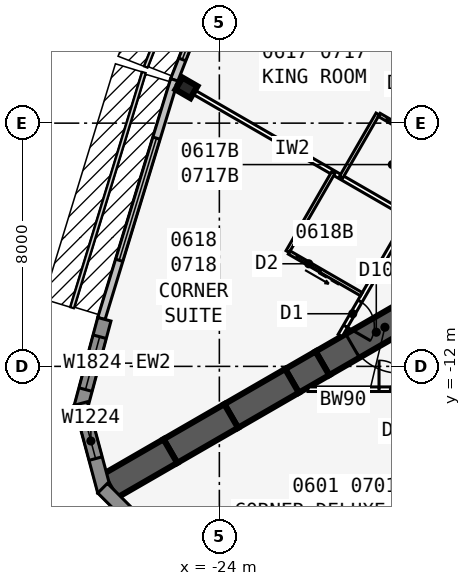
"""IFC4 building model, lengths in metres.
Left out: names, types, materials, properties, quantities, classifications, styles, units other than length and angle.
Written with IfcOpenShell. Run it as: python <this file> out.ifc"""

import sys

from ifc_helpers import new_model, si_unit, direction, frame, frame_2d, origin, origin_2d, place, context, subcontext, project, spatial, polyline, rectangle, i_section, outline, extrude, element, fill, save


model = new_model("IFC4")
c1 = context("Model", 3, precision=1e-05, world=origin(), true_north=direction((0.0, 1.0)))
c2 = subcontext(c1, "Body", "Model", "MODEL_VIEW")
j1 = project(units=[si_unit("LENGTHUNIT", "METRE"), si_unit("PLANEANGLEUNIT", "RADIAN")], contexts=[c1])
p1 = place(None, origin())
s1 = spatial("IfcSite", under=j1, at=p1, CompositionType="ELEMENT")
p2 = place(p1, origin())
s2 = spatial("IfcBuilding", under=s1, at=p2, CompositionType="ELEMENT")
p3 = place(p2, frame((0.0, 0.0, 31.9)))
s3 = spatial("IfcBuildingStorey", under=s2, at=p3, CompositionType="ELEMENT", Elevation=31.9)
p4 = place(p3, frame((-16.5, -9.526, 0.0), z_axis=(0.0, 0.0, 1.0), x_axis=(-0.866031398331, -0.499989616998, 0.0)))
e1 = element("IfcWall", 1, at=p4, inside=s3, PredefinedType="SHEAR", context=c2, shape_type="SweptSolid", body=[
    extrude(rectangle(XDim=4.746, YDim=0.9, at=frame_2d((2.373, 0.0))), origin(), (0.0, 0.0, 1.0), 3.4),
])
p5 = place(p4, frame((1.8, 0.0, 0.0)))
e2 = element("IfcOpeningElement", 2, at=p5, cuts=e1, PredefinedType="OPENING", context=c2, shape_type="SweptSolid", body=[
    extrude(rectangle(XDim=1.8, YDim=2.13, at=frame_2d((0.9, 1.065))), frame((0.0, 0.46, 0.0), z_axis=(0.0, -1.0, 0.0), x_axis=(1.0, 0.0, 0.0)), (0.0, 0.0, 1.0), 0.92),
])
p6 = place(p3, frame((-20.61, -11.899, 0.0), z_axis=(0.0, 0.0, 1.0), x_axis=(-0.866009537788, -0.500027479704, 0.0)))
e3 = element("IfcWall", 3, at=p6, inside=s3, PredefinedType="SHEAR", context=c2, shape_type="SweptSolid", body=[
    extrude(rectangle(XDim=1.155, YDim=0.9, at=frame_2d((0.577, 0.0))), origin(), (0.0, 0.0, 1.0), 3.4),
])
for number, where, z_axis, x_axis in (
    (4, (-21.61, -12.477, 0.0), (0.0, 0.0, 1.0), (-0.866, -0.5, 0.0)),
    (5, (-23.61, -13.631, 0.0), (0.0, 0.0, 1.0), (-0.866, -0.5, 0.0)),
    (6, (-25.61, -14.786, 0.0), (0.0, 0.0, 1.0), (-0.866, -0.5, 0.0)),
):
    element("IfcWall", number, at=place(p3, frame(where, z_axis=z_axis, x_axis=x_axis)), inside=s3, PredefinedType="SHEAR", context=c2, shape_type="SweptSolid", body=[
        extrude(rectangle(XDim=2.309, YDim=0.9, at=frame_2d((1.155, 0.0))), origin(), (0.0, 0.0, 1.0), 3.4),
    ])
p7 = place(p3, frame((-25.083, -2.839, 0.0), z_axis=(0.0, 0.0, 1.0), x_axis=(-0.5, -0.866025403784, 0.0)))
e7 = element("IfcColumn", 7, at=p7, inside=s3, PredefinedType="COLUMN", context=c2, shape_type="SweptSolid", body=[
    extrude(i_section(OverallWidth=0.455, OverallDepth=0.569, WebThickness=0.078, FlangeThickness=0.125, at=origin_2d()), origin(), (0.0, 0.0, 1.0), 3.4),
])
p8 = place(p3, frame((-23.645, 2.126, 0.0), z_axis=(0.0, 0.0, 1.0), x_axis=(-0.364013463868, -0.931393685894, 0.0)))
e8 = element("IfcWall", 8, at=p8, inside=s3, PredefinedType="STANDARD", context=c2, shape_type="SweptSolid", body=[
    extrude(rectangle(XDim=5.058, YDim=0.25, at=frame_2d((2.529, 0.0))), origin(), (0.0, 0.0, 1.0), 3.235),
])
p9 = place(p8, frame((0.729, 0.0, 0.45)))
e9 = element("IfcOpeningElement", 9, at=p9, cuts=e8, PredefinedType="OPENING", context=c2, shape_type="SweptSolid", body=[
    extrude(rectangle(XDim=3.6, YDim=2.4, at=frame_2d((1.8, 1.2))), frame((0.0, 0.135, 0.0), z_axis=(0.0, -1.0, 0.0), x_axis=(1.0, 0.0, 0.0)), (0.0, 0.0, 1.0), 0.27),
])
p10 = place(p3, frame((-25.483, -2.575, 0.0), z_axis=(0.0, 0.0, 1.0), x_axis=(-0.2919790669, -0.956424709265, 0.0)))
e10 = element("IfcWall", 10, at=p10, inside=s3, PredefinedType="STANDARD", context=c2, shape_type="SweptSolid", body=[
    extrude(rectangle(XDim=8.211, YDim=0.25, at=frame_2d((4.105, 0.0))), origin(), (0.0, 0.0, 1.0), 3.235),
])
p11 = place(p10, frame((2.006, 0.0, 0.45)))
e11 = element("IfcOpeningElement", 11, at=p11, cuts=e10, PredefinedType="OPENING", context=c2, shape_type="SweptSolid", body=[
    extrude(rectangle(XDim=4.2, YDim=2.4, at=frame_2d((2.1, 1.2))), frame((0.0, 0.135, 0.0), z_axis=(0.0, -1.0, 0.0), x_axis=(1.0, 0.0, 0.0)), (0.0, 0.0, 1.0), 0.27),
])
p12 = place(p3, frame((-27.783, -10.45, 0.0), z_axis=(0.0, 0.0, 1.0), x_axis=(-0.258780998834, -0.965936019953, 0.0)))
e12 = element("IfcWall", 12, at=p12, inside=s3, PredefinedType="SOLIDWALL", context=c2, shape_type="SweptSolid", body=[
    extrude(rectangle(XDim=2.989, YDim=0.45, at=frame_2d((1.494, 0.0))), origin(), (0.0, 0.0, 1.0), 3.235),
])
p13 = place(p12, frame((0.594, 0.0, 0.45)))
e13 = element("IfcOpeningElement", 13, at=p13, cuts=e12, PredefinedType="OPENING", context=c2, shape_type="SweptSolid", body=[
    extrude(rectangle(XDim=1.8, YDim=2.4, at=frame_2d((0.9, 1.2))), frame((0.0, 0.235, 0.0), z_axis=(0.0, -1.0, 0.0), x_axis=(1.0, 0.0, 0.0)), (0.0, 0.0, 1.0), 0.47),
])
p14 = place(p3, frame((-28.556, -13.221, 0.0), z_axis=(0.0, 0.0, 1.0), x_axis=(0.258801419081, -0.965930548995, 0.0)))
e14 = element("IfcWall", 14, at=p14, inside=s3, PredefinedType="SOLIDWALL", context=c2, shape_type="SweptSolid", body=[
    extrude(outline(polyline([(2.989, 0.225), (2.929, 0.225), (2.437, 0.093), (2.402, 0.225), (0.0, 0.225), (0.0, -0.225), (2.989, -0.225), (2.989, 0.225)])), origin(), (0.0, 0.0, 1.0), 3.235),
])
p15 = place(p14, frame((0.676, 0.0, 0.45)))
e15 = element("IfcOpeningElement", 15, at=p15, cuts=e14, PredefinedType="OPENING", context=c2, shape_type="SweptSolid", body=[
    extrude(rectangle(XDim=1.2, YDim=2.4, at=frame_2d((0.6, 1.2))), frame((0.0, 0.235, 0.0), z_axis=(0.0, -1.0, 0.0), x_axis=(1.0, 0.0, 0.0)), (0.0, 0.0, 1.0), 0.47),
])
p16 = place(p3, frame((-27.841, -16.007, 0.0), z_axis=(0.0, 0.0, 1.0), x_axis=(0.707025086683, -0.707188466253, 0.0)))
e16 = element("IfcWall", 16, at=p16, inside=s3, PredefinedType="SOLIDWALL", context=c2, shape_type="SweptSolid", body=[
    extrude(outline(polyline([(2.989, 0.225), (0.586, 0.225), (0.551, 0.093), (0.059, 0.225), (0.0, 0.225), (0.0, -0.225), (2.989, -0.225), (2.989, 0.225)])), origin(), (0.0, 0.0, 1.0), 3.235),
])
p17 = place(p16, frame((1.113, 0.0, 0.45)))
e17 = element("IfcOpeningElement", 17, at=p17, cuts=e16, PredefinedType="OPENING", context=c2, shape_type="SweptSolid", body=[
    extrude(rectangle(XDim=1.2, YDim=2.4, at=frame_2d((0.6, 1.2))), frame((0.0, 0.235, 0.0), z_axis=(0.0, -1.0, 0.0), x_axis=(1.0, 0.0, 0.0)), (0.0, 0.0, 1.0), 0.47),
])
p18 = place(p3, frame((-21.086, -12.751, 0.0), z_axis=(0.0, 0.0, 1.0), x_axis=(1.0, 0.0, 0.0)))
e18 = element("IfcWall", 18, at=p18, inside=s3, PredefinedType="PARTITIONING", context=c2, shape_type="SweptSolid", body=[
    extrude(rectangle(XDim=42.172, YDim=0.15, at=frame_2d((21.086, 0.0))), origin(), (0.0, 0.0, 1.0), 3.235),
])
p19 = place(p18, frame((2.338, 0.0, 0.0)))
e19 = element("IfcOpeningElement", 19, at=p19, cuts=e18, PredefinedType="OPENING", context=c2, shape_type="SweptSolid", body=[
    extrude(rectangle(XDim=0.95, YDim=2.13, at=frame_2d((0.475, 1.065))), frame((0.0, 0.085, 0.0), z_axis=(0.0, -1.0, 0.0), x_axis=(1.0, 0.0, 0.0)), (0.0, 0.0, 1.0), 0.17),
])
p20 = place(p18, frame((12.511, 0.0, 0.0)))
e20 = element("IfcOpeningElement", 20, at=p20, cuts=e18, PredefinedType="OPENING", context=c2, shape_type="SweptSolid", body=[
    extrude(rectangle(XDim=0.95, YDim=2.13, at=frame_2d((0.475, 1.065))), frame((0.0, 0.085, 0.0), z_axis=(0.0, -1.0, 0.0), x_axis=(1.0, 0.0, 0.0)), (0.0, 0.0, 1.0), 0.17),
])
p21 = place(p18, frame((18.711, 0.0, 0.0)))
e21 = element("IfcOpeningElement", 21, at=p21, cuts=e18, PredefinedType="OPENING", context=c2, shape_type="SweptSolid", body=[
    extrude(rectangle(XDim=0.95, YDim=2.13, at=frame_2d((0.475, 1.065))), frame((0.0, 0.085, 0.0), z_axis=(0.0, -1.0, 0.0), x_axis=(1.0, 0.0, 0.0)), (0.0, 0.0, 1.0), 0.17),
])
p22 = place(p18, frame((23.086, 0.0, 0.0)))
e22 = element("IfcOpeningElement", 22, at=p22, cuts=e18, PredefinedType="OPENING", context=c2, shape_type="SweptSolid", body=[
    extrude(rectangle(XDim=1.0, YDim=2.13, at=frame_2d((0.5, 1.065))), frame((0.0, 0.085, 0.0), z_axis=(0.0, -1.0, 0.0), x_axis=(1.0, 0.0, 0.0)), (0.0, 0.0, 1.0), 0.17),
])
p23 = place(p18, frame((27.511, 0.0, 0.0)))
e23 = element("IfcOpeningElement", 23, at=p23, cuts=e18, PredefinedType="OPENING", context=c2, shape_type="SweptSolid", body=[
    extrude(rectangle(XDim=0.95, YDim=2.13, at=frame_2d((0.475, 1.065))), frame((0.0, 0.085, 0.0), z_axis=(0.0, -1.0, 0.0), x_axis=(1.0, 0.0, 0.0)), (0.0, 0.0, 1.0), 0.17),
])
p24 = place(p18, frame((34.311, 0.0, 0.0)))
e24 = element("IfcOpeningElement", 24, at=p24, cuts=e18, PredefinedType="OPENING", context=c2, shape_type="SweptSolid", body=[
    extrude(rectangle(XDim=0.95, YDim=2.13, at=frame_2d((0.475, 1.065))), frame((0.0, 0.085, 0.0), z_axis=(0.0, -1.0, 0.0), x_axis=(1.0, 0.0, 0.0)), (0.0, 0.0, 1.0), 0.17),
])
p25 = place(p18, frame((39.311, 0.0, 0.0)))
e25 = element("IfcOpeningElement", 25, at=p25, cuts=e18, PredefinedType="OPENING", context=c2, shape_type="SweptSolid", body=[
    extrude(rectangle(XDim=0.95, YDim=2.13, at=frame_2d((0.475, 1.065))), frame((0.0, 0.085, 0.0), z_axis=(0.0, -1.0, 0.0), x_axis=(1.0, 0.0, 0.0)), (0.0, 0.0, 1.0), 0.17),
])
p26 = place(p3, frame((-0.5, 22.836, 0.0), z_axis=(0.0, 0.0, 1.0), x_axis=(-0.500001677587, -0.866024435227, 0.0)))
e26 = element("IfcWall", 26, at=p26, inside=s3, PredefinedType="PARTITIONING", context=c2, shape_type="SweptSolid", body=[
    extrude(rectangle(XDim=39.054, YDim=0.15, at=frame_2d((19.527, 0.0))), origin(), (0.0, 0.0, 1.0), 3.235),
])
p27 = place(p26, frame((1.558, 0.0, 0.0)))
e27 = element("IfcOpeningElement", 27, at=p27, cuts=e26, PredefinedType="OPENING", context=c2, shape_type="SweptSolid", body=[
    extrude(rectangle(XDim=0.95, YDim=2.13, at=frame_2d((0.475, 1.065))), frame((0.0, 0.085, 0.0), z_axis=(0.0, -1.0, 0.0), x_axis=(1.0, 0.0, 0.0)), (0.0, 0.0, 1.0), 0.17),
])
p28 = place(p26, frame((15.352, 0.0, 0.0)))
e28 = element("IfcOpeningElement", 28, at=p28, cuts=e26, PredefinedType="OPENING", context=c2, shape_type="SweptSolid", body=[
    extrude(rectangle(XDim=0.95, YDim=2.13, at=frame_2d((0.475, 1.065))), frame((0.0, 0.085, 0.0), z_axis=(0.0, -1.0, 0.0), x_axis=(1.0, 0.0, 0.0)), (0.0, 0.0, 1.0), 0.17),
])
p29 = place(p26, frame((22.752, 0.0, 0.0)))
e29 = element("IfcOpeningElement", 29, at=p29, cuts=e26, PredefinedType="OPENING", context=c2, shape_type="SweptSolid", body=[
    extrude(rectangle(XDim=0.95, YDim=2.13, at=frame_2d((0.475, 1.065))), frame((0.0, 0.085, 0.0), z_axis=(0.0, -1.0, 0.0), x_axis=(1.0, 0.0, 0.0)), (0.0, 0.0, 1.0), 0.17),
])
p30 = place(p26, frame((30.952, 0.0, 0.0)))
e30 = element("IfcOpeningElement", 30, at=p30, cuts=e26, PredefinedType="OPENING", context=c2, shape_type="SweptSolid", body=[
    extrude(rectangle(XDim=0.95, YDim=2.13, at=frame_2d((0.475, 1.065))), frame((0.0, 0.085, 0.0), z_axis=(0.0, -1.0, 0.0), x_axis=(1.0, 0.0, 0.0)), (0.0, 0.0, 1.0), 0.17),
])
p31 = place(p26, frame((37.752, 0.0, 0.0)))
e31 = element("IfcOpeningElement", 31, at=p31, cuts=e26, PredefinedType="OPENING", context=c2, shape_type="SweptSolid", body=[
    extrude(rectangle(XDim=0.95, YDim=2.13, at=frame_2d((0.475, 1.065))), frame((0.0, 0.085, 0.0), z_axis=(0.0, -1.0, 0.0), x_axis=(1.0, 0.0, 0.0)), (0.0, 0.0, 1.0), 0.17),
])
p32 = place(p3, frame((-15.329, -2.697, 0.0), z_axis=(0.0, 0.0, 1.0), x_axis=(-0.866018409083, 0.500012114982, 0.0)))
e32 = element("IfcWall", 32, at=p32, inside=s3, PredefinedType="PARTITIONING", context=c2, shape_type="SweptSolid", body=[
    extrude(rectangle(XDim=9.485, YDim=0.15, at=frame_2d((4.742, 0.0))), origin(), (0.0, 0.0, 1.0), 2.389),
])
p33 = place(p3, frame((-17.829, -7.027, 0.0), z_axis=(0.0, 0.0, 1.0), x_axis=(-0.866032659912, 0.499987431809, 0.0)))
e33 = element("IfcWall", 33, at=p33, inside=s3, PredefinedType="PARTITIONING", context=c2, shape_type="SweptSolid", body=[
    extrude(rectangle(XDim=8.72, YDim=0.15, at=frame_2d((4.36, 0.0))), origin(), (0.0, 0.0, 1.0), 2.389),
])
p34 = place(p3, frame((-18.793, -3.699, 0.0), z_axis=(0.0, 0.0, 1.0), x_axis=(-0.500001309137, -0.866024647952, 0.0)))
e34 = element("IfcWall", 34, at=p34, inside=s3, PredefinedType="PLUMBINGWALL", context=c2, shape_type="SweptSolid", body=[
    extrude(rectangle(XDim=2.4, YDim=0.12, at=frame_2d((1.2, 0.0))), origin(), (0.0, 0.0, 1.0), 3.235),
])
p35 = place(p3, frame((-16.628, -4.949, 0.0), z_axis=(0.0, 0.0, 1.0), x_axis=(-0.866048967903, 0.499959183527, 0.0)))
e35 = element("IfcWall", 35, at=p35, inside=s3, PredefinedType="PLUMBINGWALL", context=c2, shape_type="SweptSolid", body=[
    extrude(rectangle(XDim=2.44, YDim=0.12, at=frame_2d((1.22, 0.0))), origin(), (0.0, 0.0, 1.0), 3.235),
])
p36 = place(p35, frame((1.25, 0.0, 0.0)))
e36 = element("IfcOpeningElement", 36, at=p36, cuts=e35, PredefinedType="OPENING", context=c2, shape_type="SweptSolid", body=[
    extrude(rectangle(XDim=0.9, YDim=2.13, at=frame_2d((0.45, 1.065))), frame((0.0, 0.07, 0.0), z_axis=(0.0, -1.0, 0.0), x_axis=(1.0, 0.0, 0.0)), (0.0, 0.0, 1.0), 0.14),
])
p37 = place(p3, frame((-20.253, -5.627, 0.0), z_axis=(0.0, 0.0, 1.0), x_axis=(-0.499990139034, -0.866031096941, 0.0)))
e37 = element("IfcWall", 37, at=p37, inside=s3, PredefinedType="PLUMBINGWALL", context=c2, shape_type="SweptSolid", body=[
    extrude(rectangle(XDim=3.0, YDim=0.12, at=frame_2d((1.5, 0.0))), origin(), (0.0, 0.0, 1.0), 3.235),
])
p38 = place(p3, frame((-19.329, -9.625, 0.0), z_axis=(0.0, 0.0, 1.0), x_axis=(-0.866035715982, 0.499982138324, 0.0)))
e38 = element("IfcWall", 38, at=p38, inside=s3, PredefinedType="PLUMBINGWALL", context=c2, shape_type="SweptSolid", body=[
    extrude(rectangle(XDim=2.74, YDim=0.12, at=frame_2d((1.37, 0.0))), origin(), (0.0, 0.0, 1.0), 3.235),
])
p39 = place(p38, frame((1.55, 0.0, 0.0)))
e39 = element("IfcOpeningElement", 39, at=p39, cuts=e38, PredefinedType="OPENING", context=c2, shape_type="SweptSolid", body=[
    extrude(rectangle(XDim=0.9, YDim=2.13, at=frame_2d((0.45, 1.065))), frame((0.0, 0.07, 0.0), z_axis=(0.0, -1.0, 0.0), x_axis=(1.0, 0.0, 0.0)), (0.0, 0.0, 1.0), 0.14),
])
p40 = place(p9, origin())
e40 = element("IfcWindow", 40, at=p40, inside=s3, PartitioningType="SINGLE_PANEL", PredefinedType="WINDOW", context=c2, shape_type="SweptSolid", body=[
    extrude(rectangle(XDim=3.6, YDim=2.4, at=frame_2d((1.8, 1.2))), frame((0.0, 0.03, 0.0), z_axis=(0.0, -1.0, 0.0), x_axis=(1.0, 0.0, 0.0)), (0.0, 0.0, 1.0), 0.06),
])
fill(e9, e40)
p41 = place(p11, origin())
e41 = element("IfcWindow", 41, at=p41, inside=s3, PartitioningType="SINGLE_PANEL", PredefinedType="WINDOW", context=c2, shape_type="SweptSolid", body=[
    extrude(rectangle(XDim=4.2, YDim=2.4, at=frame_2d((2.1, 1.2))), frame((0.0, 0.03, 0.0), z_axis=(0.0, -1.0, 0.0), x_axis=(1.0, 0.0, 0.0)), (0.0, 0.0, 1.0), 0.06),
])
fill(e11, e41)
p42 = place(p13, origin())
e42 = element("IfcWindow", 42, at=p42, inside=s3, PartitioningType="SINGLE_PANEL", PredefinedType="WINDOW", context=c2, shape_type="SweptSolid", body=[
    extrude(rectangle(XDim=1.8, YDim=2.4, at=frame_2d((0.9, 1.2))), frame((0.0, 0.03, 0.0), z_axis=(0.0, -1.0, 0.0), x_axis=(1.0, 0.0, 0.0)), (0.0, 0.0, 1.0), 0.06),
])
fill(e13, e42)
p43 = place(p15, origin())
e43 = element("IfcWindow", 43, at=p43, inside=s3, PartitioningType="SINGLE_PANEL", PredefinedType="WINDOW", context=c2, shape_type="SweptSolid", body=[
    extrude(rectangle(XDim=1.2, YDim=2.4, at=frame_2d((0.6, 1.2))), frame((0.0, 0.03, 0.0), z_axis=(0.0, -1.0, 0.0), x_axis=(1.0, 0.0, 0.0)), (0.0, 0.0, 1.0), 0.06),
])
fill(e15, e43)
p44 = place(p19, origin())
e44 = element("IfcDoor", 44, at=p44, inside=s3, OperationType="SINGLE_SWING_LEFT", PredefinedType="DOOR", context=c2, shape_type="SweptSolid", body=[
    extrude(rectangle(XDim=0.95, YDim=2.13, at=frame_2d((0.475, 1.065))), frame((0.0, 0.025, 0.0), z_axis=(0.0, -1.0, 0.0), x_axis=(1.0, 0.0, 0.0)), (0.0, 0.0, 1.0), 0.05),
])
fill(e19, e44)
p45 = place(p36, origin())
e45 = element("IfcDoor", 45, at=p45, inside=s3, OperationType="SLIDING_TO_LEFT", PredefinedType="DOOR", context=c2, shape_type="SweptSolid", body=[
    extrude(rectangle(XDim=0.9, YDim=2.13, at=frame_2d((0.45, 1.065))), frame((0.0, 0.025, 0.0), z_axis=(0.0, -1.0, 0.0), x_axis=(1.0, 0.0, 0.0)), (0.0, 0.0, 1.0), 0.05),
])
fill(e36, e45)
p46 = place(p39, origin())
e46 = element("IfcDoor", 46, at=p46, inside=s3, OperationType="SLIDING_TO_LEFT", PredefinedType="DOOR", context=c2, shape_type="SweptSolid", body=[
    extrude(rectangle(XDim=0.9, YDim=2.13, at=frame_2d((0.45, 1.065))), frame((0.0, 0.025, 0.0), z_axis=(0.0, -1.0, 0.0), x_axis=(1.0, 0.0, 0.0)), (0.0, 0.0, 1.0), 0.05),
])
fill(e39, e46)
p47 = place(p31, origin())
e47 = element("IfcDoor", 47, at=p47, inside=s3, OperationType="SINGLE_SWING_RIGHT", PredefinedType="DOOR", context=c2, shape_type="SweptSolid", body=[
    extrude(rectangle(XDim=0.95, YDim=2.13, at=frame_2d((0.475, 1.065))), frame((0.0, 0.025, 0.0), z_axis=(0.0, -1.0, 0.0), x_axis=(1.0, 0.0, 0.0)), (0.0, 0.0, 1.0), 0.05),
])
fill(e31, e47)
p48 = place(p5, origin())
e48 = element("IfcDoor", 48, at=p48, inside=s3, OperationType="DOUBLE_DOOR_DOUBLE_SWING", PredefinedType="DOOR", context=c2, shape_type="SweptSolid", body=[
    extrude(rectangle(XDim=1.8, YDim=2.13, at=frame_2d((0.9, 1.065))), frame((0.0, 0.025, 0.0), z_axis=(0.0, -1.0, 0.0), x_axis=(1.0, 0.0, 0.0)), (0.0, 0.0, 1.0), 0.05),
])
fill(e2, e48)
save(model, sys.argv[1])
